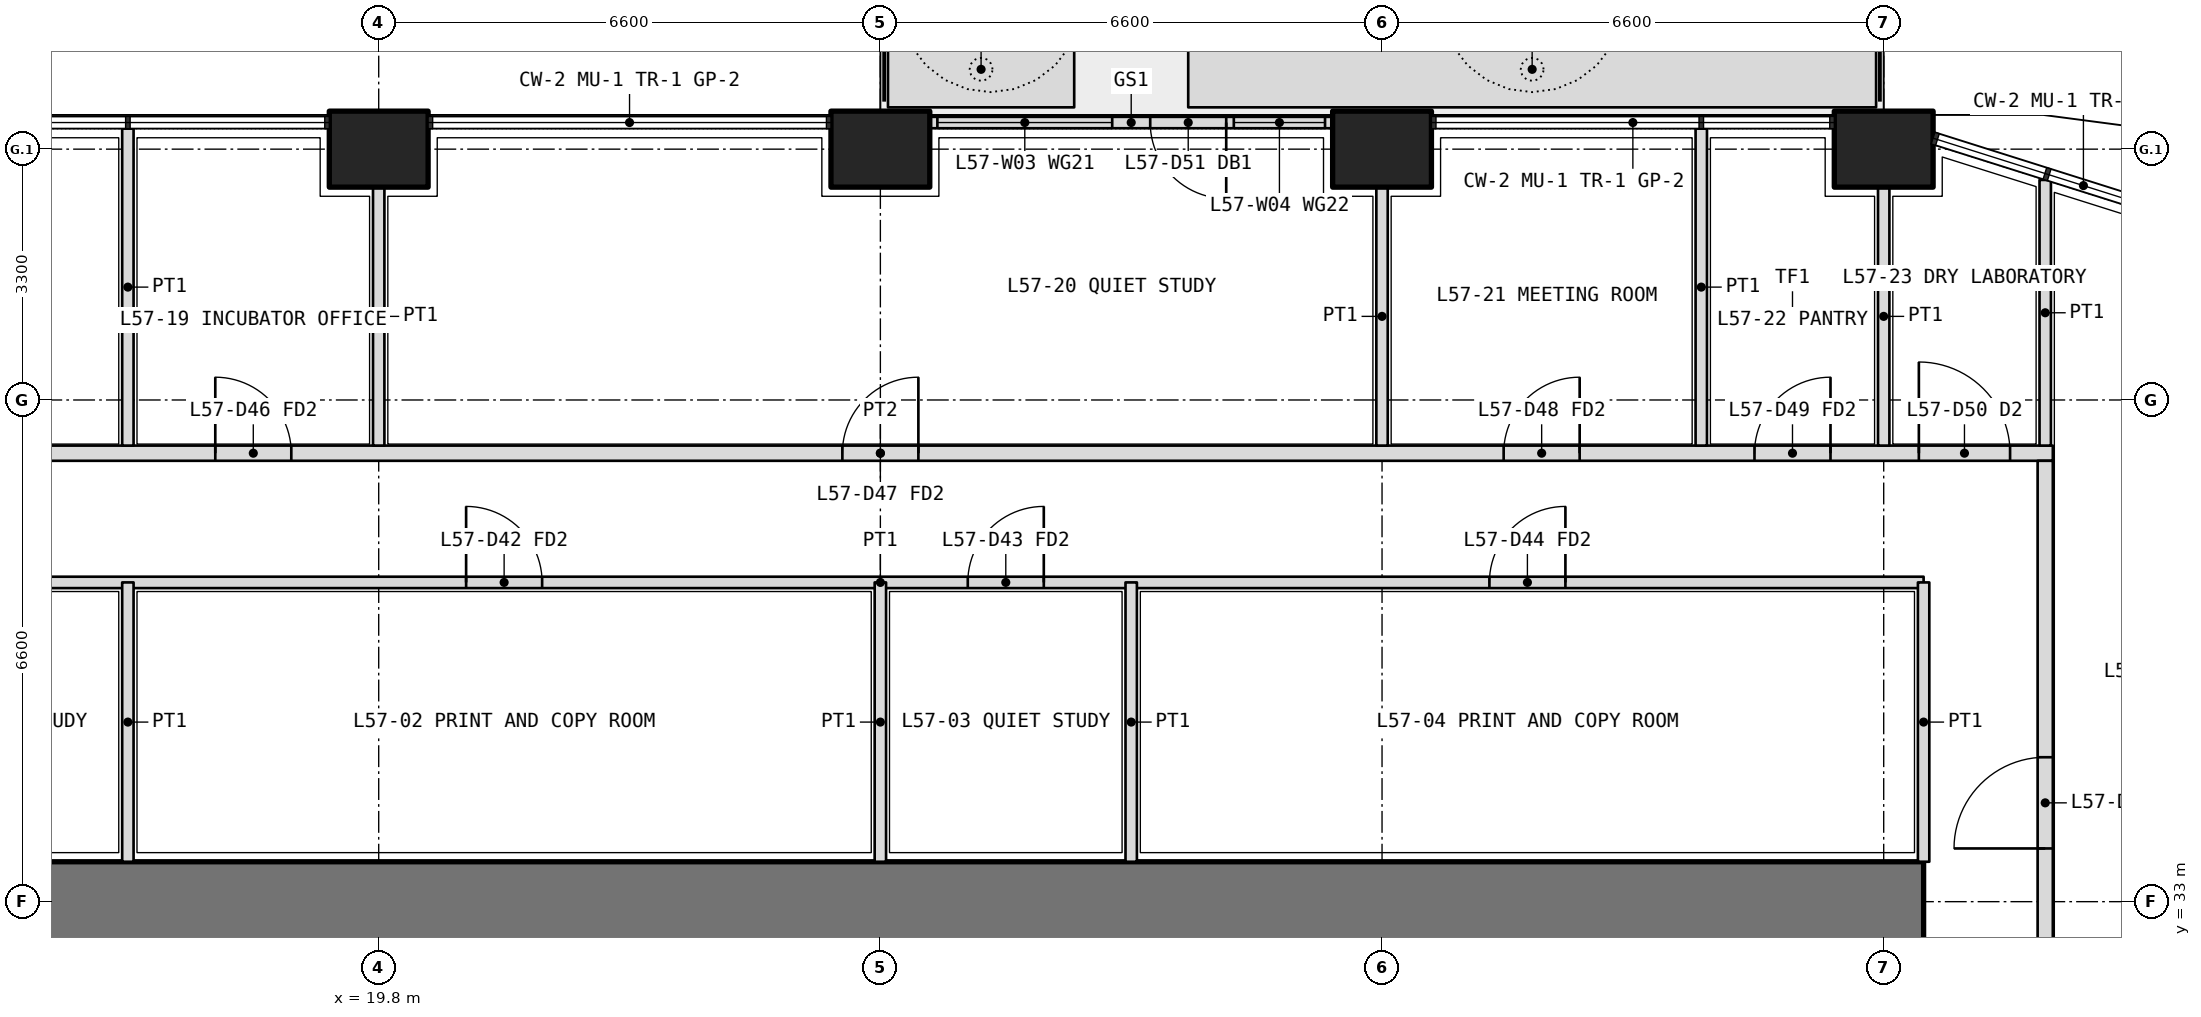
"""IFC4 building model, lengths in metres.
Left out: names, types, materials, properties, quantities, classifications, styles, units other than length and angle.
Written with IfcOpenShell. Run it as: python <this file> out.ifc"""

import sys

from ifc_helpers import new_model, si_unit, direction, frame, frame_2d, origin, origin_2d, place, context, subcontext, project, spatial, polyline, rectangle, outline, extrude, element, fill, save


model = new_model("IFC4")
c1 = context("Model", 3, precision=1e-05, world=origin(), true_north=direction((0.0, 1.0)))
c2 = subcontext(c1, "Body", "Model", "MODEL_VIEW")
j1 = project(units=[si_unit("LENGTHUNIT", "METRE"), si_unit("PLANEANGLEUNIT", "RADIAN")], contexts=[c1])
p1 = place(None, origin())
s1 = spatial("IfcSite", under=j1, at=p1, CompositionType="ELEMENT")
p2 = place(p1, origin())
s2 = spatial("IfcBuilding", under=s1, at=p2, CompositionType="ELEMENT")
p3 = place(p2, frame((0.0, 0.0, 250.2)))
s3 = spatial("IfcBuildingStorey", under=s2, at=p3, CompositionType="ELEMENT", Elevation=250.2)
for number, where, z_axis, x_axis in (
    (1, (19.8, 42.9, 0.0), (0.0, 0.0, 1.0), (1.0, 0.0, 0.0)),
    (2, (26.4, 42.9, 0.0), (0.0, 0.0, 1.0), (1.0, 0.0, 0.0)),
    (3, (33.0, 42.9, 0.0), (0.0, 0.0, 1.0), (1.0, 0.0, 0.0)),
    (4, (39.6, 42.9, 0.0), (0.0, 0.0, 1.0), (1.0, 0.0, 0.0)),
):
    element("IfcColumn", number, at=place(p3, frame(where, z_axis=z_axis, x_axis=x_axis)), inside=s3, PredefinedType="COLUMN", context=c2, shape_type="SweptSolid", body=[
        extrude(rectangle(XDim=1.3, YDim=1.0, at=origin_2d()), origin(), (0.0, 0.0, 1.0), 4.2),
    ])
p4 = place(p3, origin())
e5 = element("IfcWall", 5, at=p4, inside=s3, PredefinedType="USERDEFINED", context=c2, shape_type="SweptSolid", body=[
    extrude(outline(polyline([(26.5, 43.45), (28.95, 43.45), (28.95, 44.45), (26.5, 44.45), (26.5, 43.45)]), holes=[polyline([(26.65, 43.6), (28.8, 43.6), (28.8, 44.3), (26.65, 44.3), (26.65, 43.6)])]), origin(), (0.0, 0.0, 1.0), 1.05),
])
p5 = place(p3, origin())
e6 = element("IfcWall", 6, at=p5, inside=s3, PredefinedType="USERDEFINED", context=c2, shape_type="SweptSolid", body=[
    extrude(outline(polyline([(30.45, 43.45), (39.5, 43.45), (39.5, 44.45), (30.45, 44.45), (30.45, 43.45)]), holes=[polyline([(30.6, 43.6), (39.35, 43.6), (39.35, 44.3), (30.6, 44.3), (30.6, 43.6)])]), origin(), (0.0, 0.0, 1.0), 1.05),
])
p6 = place(p3, frame((32.35, 43.25, 0.0), z_axis=(0.0, 0.0, 1.0), x_axis=(-1.0, 0.0, 0.0)))
e7 = element("IfcWall", 7, at=p6, inside=s3, PredefinedType="SOLIDWALL", context=c2, shape_type="SweptSolid", body=[
    extrude(rectangle(XDim=5.3, YDim=0.15, at=frame_2d((2.65, 0.0))), origin(), (0.0, 0.0, 1.0), 2.7),
])
p7 = place(p6, frame((1.4, 0.0, 0.0)))
e8 = element("IfcOpeningElement", 8, at=p7, cuts=e7, PredefinedType="OPENING", context=c2, shape_type="SweptSolid", body=[
    extrude(rectangle(XDim=1.0, YDim=2.4, at=frame_2d((0.5, 1.2))), frame((0.0, 0.085, 0.0), z_axis=(0.0, -1.0, 0.0), x_axis=(1.0, 0.0, 0.0)), (0.0, 0.0, 1.0), 0.17),
])
p8 = place(p6, frame((0.1, 0.0, 0.1)))
e9 = element("IfcOpeningElement", 9, at=p8, cuts=e7, PredefinedType="OPENING", context=c2, shape_type="SweptSolid", body=[
    extrude(rectangle(XDim=1.2, YDim=2.3, at=frame_2d((0.6, 1.15))), frame((0.0, 0.085, 0.0), z_axis=(0.0, -1.0, 0.0), x_axis=(1.0, 0.0, 0.0)), (0.0, 0.0, 1.0), 0.17),
])
p9 = place(p6, frame((2.9, 0.0, 0.1)))
e10 = element("IfcOpeningElement", 10, at=p9, cuts=e7, PredefinedType="OPENING", context=c2, shape_type="SweptSolid", body=[
    extrude(rectangle(XDim=2.3, YDim=2.3, at=frame_2d((1.15, 1.15))), frame((0.0, 0.085, 0.0), z_axis=(0.0, -1.0, 0.0), x_axis=(1.0, 0.0, 0.0)), (0.0, 0.0, 1.0), 0.17),
])
p10 = place(p3, frame((40.125, 33.0, 0.0), z_axis=(0.0, 0.0, 1.0), x_axis=(-1.0, 0.0, 0.0)))
e11 = element("IfcWall", 11, at=p10, inside=s3, PredefinedType="SHEAR", context=c2, shape_type="SweptSolid", body=[
    extrude(rectangle(XDim=27.45, YDim=1.05, at=frame_2d((13.725, 0.0))), origin(), (0.0, 0.0, 1.0), 4.2),
])
p11 = place(p3, frame((12.675, 37.2, 0.0), z_axis=(0.0, 0.0, 1.0), x_axis=(1.0, 0.0, 0.0)))
e12 = element("IfcWall", 12, at=p11, inside=s3, PredefinedType="PARTITIONING", context=c2, shape_type="SweptSolid", body=[
    extrude(rectangle(XDim=27.45, YDim=0.15, at=frame_2d((13.725, 0.0))), origin(), (0.0, 0.0, 1.0), 3.0),
])
p12 = place(p11, frame((1.413, 0.0, 0.0)))
e13 = element("IfcOpeningElement", 13, at=p12, cuts=e12, PredefinedType="OPENING", context=c2, shape_type="SweptSolid", body=[
    extrude(rectangle(XDim=1.0, YDim=2.1, at=frame_2d((0.5, 1.05))), frame((0.0, 0.085, 0.0), z_axis=(0.0, -1.0, 0.0), x_axis=(1.0, 0.0, 0.0)), (0.0, 0.0, 1.0), 0.17),
])
p13 = place(p11, frame((8.275, 0.0, 0.0)))
e14 = element("IfcOpeningElement", 14, at=p13, cuts=e12, PredefinedType="OPENING", context=c2, shape_type="SweptSolid", body=[
    extrude(rectangle(XDim=1.0, YDim=2.1, at=frame_2d((0.5, 1.05))), frame((0.0, 0.085, 0.0), z_axis=(0.0, -1.0, 0.0), x_axis=(1.0, 0.0, 0.0)), (0.0, 0.0, 1.0), 0.17),
])
p14 = place(p11, frame((14.875, 0.0, 0.0)))
e15 = element("IfcOpeningElement", 15, at=p14, cuts=e12, PredefinedType="OPENING", context=c2, shape_type="SweptSolid", body=[
    extrude(rectangle(XDim=1.0, YDim=2.1, at=frame_2d((0.5, 1.05))), frame((0.0, 0.085, 0.0), z_axis=(0.0, -1.0, 0.0), x_axis=(1.0, 0.0, 0.0)), (0.0, 0.0, 1.0), 0.17),
])
p15 = place(p11, frame((21.738, 0.0, 0.0)))
e16 = element("IfcOpeningElement", 16, at=p15, cuts=e12, PredefinedType="OPENING", context=c2, shape_type="SweptSolid", body=[
    extrude(rectangle(XDim=1.0, YDim=2.1, at=frame_2d((0.5, 1.05))), frame((0.0, 0.085, 0.0), z_axis=(0.0, -1.0, 0.0), x_axis=(1.0, 0.0, 0.0)), (0.0, 0.0, 1.0), 0.17),
])
p16 = place(p3, frame((40.125, 33.525, 0.0), z_axis=(0.0, 0.0, 1.0), x_axis=(0.0, 1.0, 0.0)))
e17 = element("IfcWall", 17, at=p16, inside=s3, PredefinedType="PARTITIONING", context=c2, shape_type="SweptSolid", body=[
    extrude(rectangle(XDim=3.675, YDim=0.15, at=frame_2d((1.837, 0.0))), origin(), (0.0, 0.0, 1.0), 3.0),
])
p17 = place(p3, frame((16.5, 33.525, 0.0), z_axis=(0.0, 0.0, 1.0), x_axis=(0.0, 1.0, 0.0)))
e18 = element("IfcWall", 18, at=p17, inside=s3, PredefinedType="PARTITIONING", context=c2, shape_type="SweptSolid", body=[
    extrude(rectangle(XDim=3.675, YDim=0.15, at=frame_2d((1.837, 0.0))), origin(), (0.0, 0.0, 1.0), 3.9),
])
p18 = place(p3, frame((26.4, 33.525, 0.0), z_axis=(0.0, 0.0, 1.0), x_axis=(0.0, 1.0, 0.0)))
e19 = element("IfcWall", 19, at=p18, inside=s3, PredefinedType="PARTITIONING", context=c2, shape_type="SweptSolid", body=[
    extrude(rectangle(XDim=3.675, YDim=0.15, at=frame_2d((1.837, 0.0))), origin(), (0.0, 0.0, 1.0), 3.0),
])
p19 = place(p3, frame((29.7, 33.525, 0.0), z_axis=(0.0, 0.0, 1.0), x_axis=(0.0, 1.0, 0.0)))
e20 = element("IfcWall", 20, at=p19, inside=s3, PredefinedType="PARTITIONING", context=c2, shape_type="SweptSolid", body=[
    extrude(rectangle(XDim=3.675, YDim=0.15, at=frame_2d((1.837, 0.0))), origin(), (0.0, 0.0, 1.0), 3.9),
])
p20 = place(p3, frame((10.975, 38.9, 0.0), z_axis=(0.0, 0.0, 1.0), x_axis=(1.0, 0.0, 0.0)))
e21 = element("IfcWall", 21, at=p20, inside=s3, PredefinedType="PARTITIONING", context=c2, shape_type="SweptSolid", body=[
    extrude(rectangle(XDim=30.85, YDim=0.2, at=frame_2d((15.425, 0.0))), origin(), (0.0, 0.0, 1.0), 3.0),
])
p21 = place(p20, frame((2.312, 0.0, 0.0)))
e22 = element("IfcOpeningElement", 22, at=p21, cuts=e21, PredefinedType="OPENING", context=c2, shape_type="SweptSolid", body=[
    extrude(rectangle(XDim=1.0, YDim=2.1, at=frame_2d((0.5, 1.05))), frame((0.0, 0.11, 0.0), z_axis=(0.0, -1.0, 0.0), x_axis=(1.0, 0.0, 0.0)), (0.0, 0.0, 1.0), 0.22),
])
p22 = place(p20, frame((6.675, 0.0, 0.0)))
e23 = element("IfcOpeningElement", 23, at=p22, cuts=e21, PredefinedType="OPENING", context=c2, shape_type="SweptSolid", body=[
    extrude(rectangle(XDim=1.0, YDim=2.1, at=frame_2d((0.5, 1.05))), frame((0.0, 0.11, 0.0), z_axis=(0.0, -1.0, 0.0), x_axis=(1.0, 0.0, 0.0)), (0.0, 0.0, 1.0), 0.22),
])
p23 = place(p20, frame((14.925, 0.0, 0.0)))
e24 = element("IfcOpeningElement", 24, at=p23, cuts=e21, PredefinedType="OPENING", context=c2, shape_type="SweptSolid", body=[
    extrude(rectangle(XDim=1.0, YDim=2.1, at=frame_2d((0.5, 1.05))), frame((0.0, 0.11, 0.0), z_axis=(0.0, -1.0, 0.0), x_axis=(1.0, 0.0, 0.0)), (0.0, 0.0, 1.0), 0.22),
])
p24 = place(p20, frame((23.625, 0.0, 0.0)))
e25 = element("IfcOpeningElement", 25, at=p24, cuts=e21, PredefinedType="OPENING", context=c2, shape_type="SweptSolid", body=[
    extrude(rectangle(XDim=1.0, YDim=2.1, at=frame_2d((0.5, 1.05))), frame((0.0, 0.11, 0.0), z_axis=(0.0, -1.0, 0.0), x_axis=(1.0, 0.0, 0.0)), (0.0, 0.0, 1.0), 0.22),
])
p25 = place(p20, frame((26.925, 0.0, 0.0)))
e26 = element("IfcOpeningElement", 26, at=p25, cuts=e21, PredefinedType="OPENING", context=c2, shape_type="SweptSolid", body=[
    extrude(rectangle(XDim=1.0, YDim=2.1, at=frame_2d((0.5, 1.05))), frame((0.0, 0.11, 0.0), z_axis=(0.0, -1.0, 0.0), x_axis=(1.0, 0.0, 0.0)), (0.0, 0.0, 1.0), 0.22),
])
p26 = place(p20, frame((29.087, 0.0, 0.0)))
e27 = element("IfcOpeningElement", 27, at=p26, cuts=e21, PredefinedType="OPENING", context=c2, shape_type="SweptSolid", body=[
    extrude(rectangle(XDim=1.2, YDim=2.1, at=frame_2d((0.6, 1.05))), frame((0.0, 0.11, 0.0), z_axis=(0.0, -1.0, 0.0), x_axis=(1.0, 0.0, 0.0)), (0.0, 0.0, 1.0), 0.22),
])
p27 = place(p3, frame((41.725, 7.4, 0.0), z_axis=(0.0, 0.0, 1.0), x_axis=(0.0, 1.0, 0.0)))
e28 = element("IfcWall", 28, at=p27, inside=s3, PredefinedType="PARTITIONING", context=c2, shape_type="SweptSolid", body=[
    extrude(rectangle(XDim=31.4, YDim=0.2, at=frame_2d((15.7, 0.0))), origin(), (0.0, 0.0, 1.0), 3.0),
])
p28 = place(p27, frame((4.0, 0.0, 0.0)))
e29 = element("IfcOpeningElement", 29, at=p28, cuts=e28, PredefinedType="OPENING", context=c2, shape_type="SweptSolid", body=[
    extrude(rectangle(XDim=1.0, YDim=2.1, at=frame_2d((0.5, 1.05))), frame((0.0, 0.11, 0.0), z_axis=(0.0, -1.0, 0.0), x_axis=(1.0, 0.0, 0.0)), (0.0, 0.0, 1.0), 0.22),
])
p29 = place(p27, frame((10.25, 0.0, 0.0)))
e30 = element("IfcOpeningElement", 30, at=p29, cuts=e28, PredefinedType="OPENING", context=c2, shape_type="SweptSolid", body=[
    extrude(rectangle(XDim=1.0, YDim=2.1, at=frame_2d((0.5, 1.05))), frame((0.0, 0.11, 0.0), z_axis=(0.0, -1.0, 0.0), x_axis=(1.0, 0.0, 0.0)), (0.0, 0.0, 1.0), 0.22),
])
p30 = place(p27, frame((13.4, 0.0, 0.0)))
e31 = element("IfcOpeningElement", 31, at=p30, cuts=e28, PredefinedType="OPENING", context=c2, shape_type="SweptSolid", body=[
    extrude(rectangle(XDim=1.0, YDim=2.1, at=frame_2d((0.5, 1.05))), frame((0.0, 0.11, 0.0), z_axis=(0.0, -1.0, 0.0), x_axis=(1.0, 0.0, 0.0)), (0.0, 0.0, 1.0), 0.22),
])
p31 = place(p27, frame((16.75, 0.0, 0.0)))
e32 = element("IfcOpeningElement", 32, at=p31, cuts=e28, PredefinedType="OPENING", context=c2, shape_type="SweptSolid", body=[
    extrude(rectangle(XDim=0.9, YDim=2.1, at=frame_2d((0.45, 1.05))), frame((0.0, 0.11, 0.0), z_axis=(0.0, -1.0, 0.0), x_axis=(1.0, 0.0, 0.0)), (0.0, 0.0, 1.0), 0.22),
])
p32 = place(p27, frame((20.05, 0.0, 0.0)))
e33 = element("IfcOpeningElement", 33, at=p32, cuts=e28, PredefinedType="OPENING", context=c2, shape_type="SweptSolid", body=[
    extrude(rectangle(XDim=1.2, YDim=2.1, at=frame_2d((0.6, 1.05))), frame((0.0, 0.11, 0.0), z_axis=(0.0, -1.0, 0.0), x_axis=(1.0, 0.0, 0.0)), (0.0, 0.0, 1.0), 0.22),
])
p33 = place(p27, frame((26.3, 0.0, 0.0)))
e34 = element("IfcOpeningElement", 34, at=p33, cuts=e28, PredefinedType="OPENING", context=c2, shape_type="SweptSolid", body=[
    extrude(rectangle(XDim=1.2, YDim=2.1, at=frame_2d((0.6, 1.05))), frame((0.0, 0.11, 0.0), z_axis=(0.0, -1.0, 0.0), x_axis=(1.0, 0.0, 0.0)), (0.0, 0.0, 1.0), 0.22),
])
p34 = place(p3, frame((41.725, 42.495, 0.0), z_axis=(0.0, 0.0, 1.0), x_axis=(0.0, -1.0, 0.0)))
e35 = element("IfcWall", 35, at=p34, inside=s3, PredefinedType="PARTITIONING", context=c2, shape_type="SweptSolid", body=[
    extrude(rectangle(XDim=3.495, YDim=0.15, at=frame_2d((1.748, 0.0))), origin(), (0.0, 0.0, 1.0), 2.7),
])
p35 = place(p3, frame((37.2, 43.17, 0.0), z_axis=(0.0, 0.0, 1.0), x_axis=(0.0, -1.0, 0.0)))
e36 = element("IfcWall", 36, at=p35, inside=s3, PredefinedType="PARTITIONING", context=c2, shape_type="SweptSolid", body=[
    extrude(rectangle(XDim=4.17, YDim=0.15, at=frame_2d((2.085, 0.0))), origin(), (0.0, 0.0, 1.0), 2.7),
])
p36 = place(p3, frame((39.6, 42.4, 0.0), z_axis=(0.0, 0.0, 1.0), x_axis=(0.0, -1.0, 0.0)))
e37 = element("IfcWall", 37, at=p36, inside=s3, PredefinedType="PARTITIONING", context=c2, shape_type="SweptSolid", body=[
    extrude(rectangle(XDim=3.4, YDim=0.15, at=frame_2d((1.7, 0.0))), origin(), (0.0, 0.0, 1.0), 3.0),
])
p37 = place(p3, frame((16.5, 43.17, 0.0), z_axis=(0.0, 0.0, 1.0), x_axis=(0.0, -1.0, 0.0)))
e38 = element("IfcWall", 38, at=p37, inside=s3, PredefinedType="PARTITIONING", context=c2, shape_type="SweptSolid", body=[
    extrude(rectangle(XDim=4.17, YDim=0.15, at=frame_2d((2.085, 0.0))), origin(), (0.0, 0.0, 1.0), 2.7),
])
for number, where, z_axis, x_axis in (
    (39, (19.8, 42.4, 0.0), (0.0, 0.0, 1.0), (0.0, -1.0, 0.0)),
    (40, (33.0, 42.4, 0.0), (0.0, 0.0, 1.0), (0.0, -1.0, 0.0)),
):
    element("IfcWall", number, at=place(p3, frame(where, z_axis=z_axis, x_axis=x_axis)), inside=s3, PredefinedType="PARTITIONING", context=c2, shape_type="SweptSolid", body=[
        extrude(rectangle(XDim=3.4, YDim=0.15, at=frame_2d((1.7, 0.0))), origin(), (0.0, 0.0, 1.0), 3.0),
    ])
p38 = place(p7, origin())
e41 = element("IfcDoor", 41, at=p38, inside=s3, OperationType="SINGLE_SWING_LEFT", PredefinedType="DOOR", context=c2, shape_type="SweptSolid", body=[
    extrude(rectangle(XDim=1.0, YDim=2.4, at=frame_2d((0.5, 1.2))), frame((0.0, 0.025, 0.0), z_axis=(0.0, -1.0, 0.0), x_axis=(1.0, 0.0, 0.0)), (0.0, 0.0, 1.0), 0.05),
])
fill(e8, e41)
p39 = place(p8, origin())
e42 = element("IfcWindow", 42, at=p39, inside=s3, PartitioningType="SINGLE_PANEL", PredefinedType="WINDOW", context=c2, shape_type="SweptSolid", body=[
    extrude(rectangle(XDim=1.2, YDim=2.3, at=frame_2d((0.6, 1.15))), frame((0.0, 0.03, 0.0), z_axis=(0.0, -1.0, 0.0), x_axis=(1.0, 0.0, 0.0)), (0.0, 0.0, 1.0), 0.06),
])
fill(e9, e42)
p40 = place(p9, origin())
e43 = element("IfcWindow", 43, at=p40, inside=s3, PartitioningType="SINGLE_PANEL", PredefinedType="WINDOW", context=c2, shape_type="SweptSolid", body=[
    extrude(rectangle(XDim=2.3, YDim=2.3, at=frame_2d((1.15, 1.15))), frame((0.0, 0.03, 0.0), z_axis=(0.0, -1.0, 0.0), x_axis=(1.0, 0.0, 0.0)), (0.0, 0.0, 1.0), 0.06),
])
fill(e10, e43)
p41 = place(p13, origin())
e44 = element("IfcDoor", 44, at=p41, inside=s3, OperationType="SINGLE_SWING_LEFT", PredefinedType="DOOR", context=c2, shape_type="SweptSolid", body=[
    extrude(rectangle(XDim=1.0, YDim=2.1, at=frame_2d((0.5, 1.05))), frame((0.0, 0.025, 0.0), z_axis=(0.0, -1.0, 0.0), x_axis=(1.0, 0.0, 0.0)), (0.0, 0.0, 1.0), 0.05),
])
fill(e14, e44)
p42 = place(p14, origin())
e45 = element("IfcDoor", 45, at=p42, inside=s3, OperationType="SINGLE_SWING_RIGHT", PredefinedType="DOOR", context=c2, shape_type="SweptSolid", body=[
    extrude(rectangle(XDim=1.0, YDim=2.1, at=frame_2d((0.5, 1.05))), frame((0.0, 0.025, 0.0), z_axis=(0.0, -1.0, 0.0), x_axis=(1.0, 0.0, 0.0)), (0.0, 0.0, 1.0), 0.05),
])
fill(e15, e45)
p43 = place(p15, origin())
e46 = element("IfcDoor", 46, at=p43, inside=s3, OperationType="SINGLE_SWING_RIGHT", PredefinedType="DOOR", context=c2, shape_type="SweptSolid", body=[
    extrude(rectangle(XDim=1.0, YDim=2.1, at=frame_2d((0.5, 1.05))), frame((0.0, 0.025, 0.0), z_axis=(0.0, -1.0, 0.0), x_axis=(1.0, 0.0, 0.0)), (0.0, 0.0, 1.0), 0.05),
])
fill(e16, e46)
p44 = place(p33, origin())
e47 = element("IfcDoor", 47, at=p44, inside=s3, OperationType="DOUBLE_DOOR_SINGLE_SWING", PredefinedType="DOOR", context=c2, shape_type="SweptSolid", body=[
    extrude(rectangle(XDim=1.2, YDim=2.1, at=frame_2d((0.6, 1.05))), frame((0.0, 0.025, 0.0), z_axis=(0.0, -1.0, 0.0), x_axis=(1.0, 0.0, 0.0)), (0.0, 0.0, 1.0), 0.05),
])
fill(e34, e47)
p45 = place(p22, origin())
e48 = element("IfcDoor", 48, at=p45, inside=s3, OperationType="SINGLE_SWING_LEFT", PredefinedType="DOOR", context=c2, shape_type="SweptSolid", body=[
    extrude(rectangle(XDim=1.0, YDim=2.1, at=frame_2d((0.5, 1.05))), frame((0.0, 0.025, 0.0), z_axis=(0.0, -1.0, 0.0), x_axis=(1.0, 0.0, 0.0)), (0.0, 0.0, 1.0), 0.05),
])
fill(e23, e48)
p46 = place(p23, origin())
e49 = element("IfcDoor", 49, at=p46, inside=s3, OperationType="SINGLE_SWING_RIGHT", PredefinedType="DOOR", context=c2, shape_type="SweptSolid", body=[
    extrude(rectangle(XDim=1.0, YDim=2.1, at=frame_2d((0.5, 1.05))), frame((0.0, 0.025, 0.0), z_axis=(0.0, -1.0, 0.0), x_axis=(1.0, 0.0, 0.0)), (0.0, 0.0, 1.0), 0.05),
])
fill(e24, e49)
p47 = place(p24, origin())
e50 = element("IfcDoor", 50, at=p47, inside=s3, OperationType="SINGLE_SWING_RIGHT", PredefinedType="DOOR", context=c2, shape_type="SweptSolid", body=[
    extrude(rectangle(XDim=1.0, YDim=2.1, at=frame_2d((0.5, 1.05))), frame((0.0, 0.025, 0.0), z_axis=(0.0, -1.0, 0.0), x_axis=(1.0, 0.0, 0.0)), (0.0, 0.0, 1.0), 0.05),
])
fill(e25, e50)
p48 = place(p25, origin())
e51 = element("IfcDoor", 51, at=p48, inside=s3, OperationType="SINGLE_SWING_RIGHT", PredefinedType="DOOR", context=c2, shape_type="SweptSolid", body=[
    extrude(rectangle(XDim=1.0, YDim=2.1, at=frame_2d((0.5, 1.05))), frame((0.0, 0.025, 0.0), z_axis=(0.0, -1.0, 0.0), x_axis=(1.0, 0.0, 0.0)), (0.0, 0.0, 1.0), 0.05),
])
fill(e26, e51)
p49 = place(p26, origin())
e52 = element("IfcDoor", 52, at=p49, inside=s3, OperationType="DOUBLE_DOOR_SINGLE_SWING", PredefinedType="DOOR", context=c2, shape_type="SweptSolid", body=[
    extrude(rectangle(XDim=1.2, YDim=2.1, at=frame_2d((0.6, 1.05))), frame((0.0, 0.025, 0.0), z_axis=(0.0, -1.0, 0.0), x_axis=(1.0, 0.0, 0.0)), (0.0, 0.0, 1.0), 0.05),
])
fill(e27, e52)
save(model, sys.argv[1])
